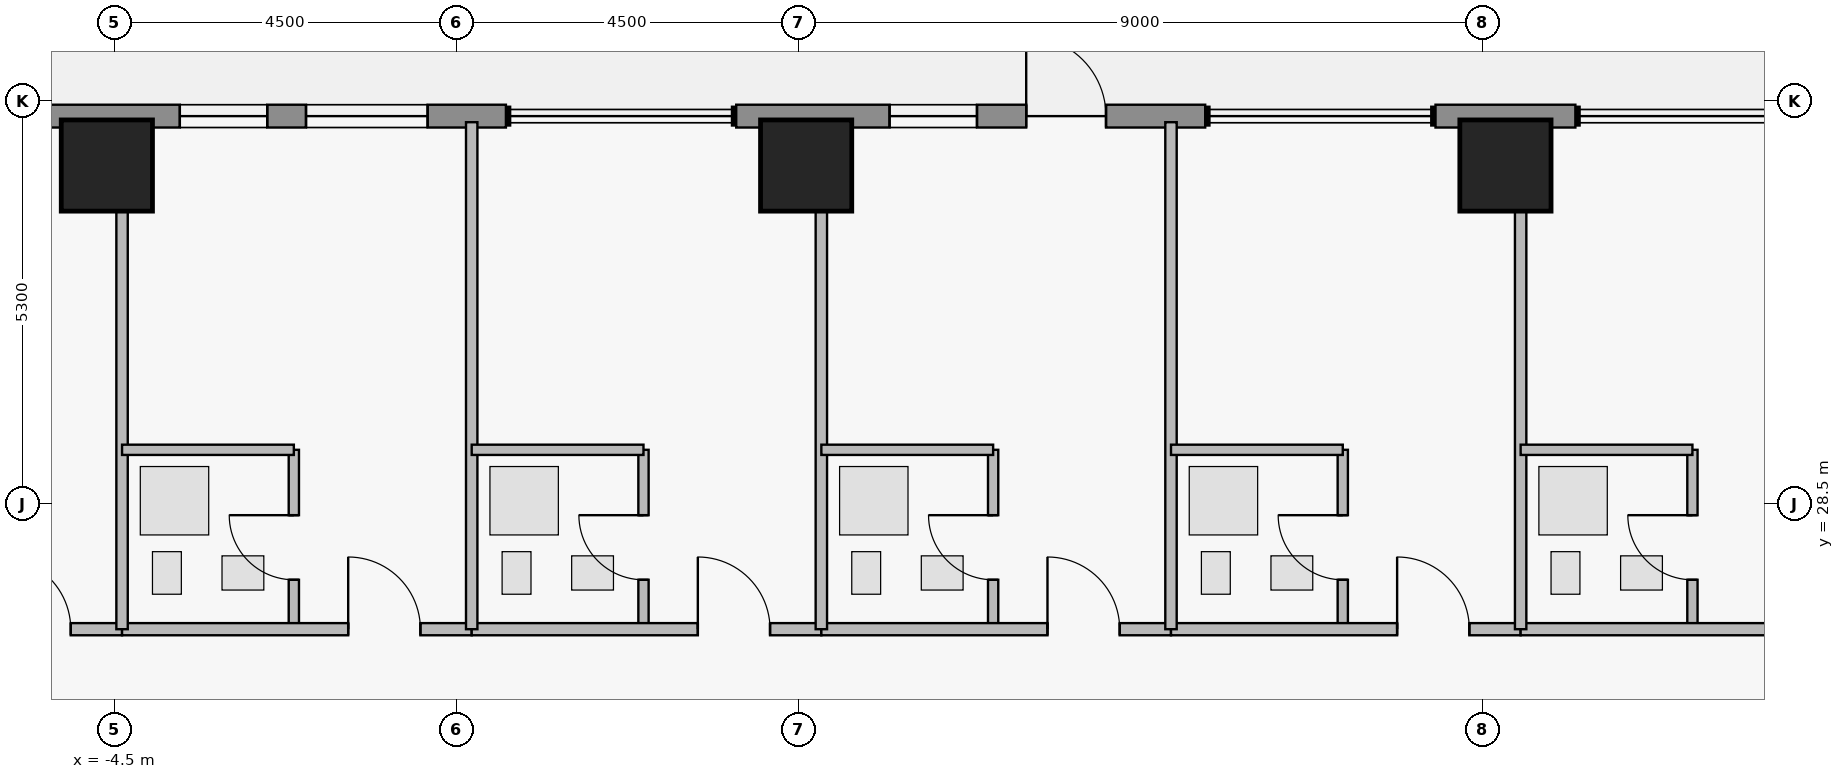
"""IFC4 building model, lengths in metres.
Left out: names, types, materials, properties, quantities, classifications, styles, units other than length and angle.
Written with IfcOpenShell. Run it as: python <this file> out.ifc"""

import sys

from ifc_helpers import new_model, si_unit, direction, frame, frame_2d, origin, origin_2d, place, context, subcontext, project, spatial, rectangle, extrude, element, fill, save


model = new_model("IFC4")
c1 = context("Model", 3, precision=1e-05, world=origin(), true_north=direction((0.0, 1.0)))
c2 = subcontext(c1, "Body", "Model", "MODEL_VIEW")
j1 = project(units=[si_unit("LENGTHUNIT", "METRE"), si_unit("PLANEANGLEUNIT", "RADIAN")], contexts=[c1])
p1 = place(None, origin())
s1 = spatial("IfcSite", under=j1, at=p1, CompositionType="ELEMENT")
p2 = place(p1, origin())
s2 = spatial("IfcBuilding", under=s1, at=p2, CompositionType="ELEMENT")
p3 = place(p2, frame((0.0, 0.0, 222.4)))
s3 = spatial("IfcBuildingStorey", under=s2, at=p3, CompositionType="ELEMENT", Elevation=222.4)
for number, where, z_axis, x_axis in (
    (1, (-4.6, 32.95, 0.0), (0.0, 0.0, 1.0), (1.0, 0.0, 0.0)),
    (2, (4.6, 32.95, 0.0), (0.0, 0.0, 1.0), (1.0, 0.0, 0.0)),
    (3, (13.8, 32.95, 0.0), (0.0, 0.0, 1.0), (1.0, 0.0, 0.0)),
):
    element("IfcColumn", number, at=place(p3, frame(where, z_axis=z_axis, x_axis=x_axis)), inside=s3, PredefinedType="COLUMN", context=c2, shape_type="SweptSolid", body=[
        extrude(rectangle(XDim=1.2, YDim=1.2, at=origin_2d()), origin(), (0.0, 0.0, 1.0), 3.75),
    ])
p4 = place(p3, frame((-5.52, 33.6, 0.0), z_axis=(0.0, 0.0, 1.0), x_axis=(1.0, 0.0, 0.0)))
e4 = element("IfcWall", 4, at=p4, inside=s3, PredefinedType="STANDARD", context=c2, shape_type="SweptSolid", body=[
    extrude(rectangle(XDim=6.17, YDim=0.3, at=frame_2d((3.085, 0.0))), origin(), (0.0, 0.0, 1.0), 3.53),
])
p5 = place(p4, frame((3.54, 0.0, 0.85)))
e5 = element("IfcOpeningElement", 5, at=p5, cuts=e4, PredefinedType="OPENING", context=c2, shape_type="SweptSolid", body=[
    extrude(rectangle(XDim=1.6, YDim=1.8, at=frame_2d((0.8, 0.9))), frame((0.0, 0.16, 0.0), z_axis=(0.0, -1.0, 0.0), x_axis=(1.0, 0.0, 0.0)), (0.0, 0.0, 1.0), 0.32),
])
p6 = place(p4, frame((1.88, 0.0, 0.95)))
e6 = element("IfcOpeningElement", 6, at=p6, cuts=e4, PredefinedType="OPENING", context=c2, shape_type="SweptSolid", body=[
    extrude(rectangle(XDim=1.15, YDim=1.55, at=frame_2d((0.575, 0.775))), frame((0.0, 0.16, 0.0), z_axis=(0.0, -1.0, 0.0), x_axis=(1.0, 0.0, 0.0)), (0.0, 0.0, 1.0), 0.32),
])
p7 = place(p3, frame((3.68, 33.6, 0.0), z_axis=(0.0, 0.0, 1.0), x_axis=(1.0, 0.0, 0.0)))
e7 = element("IfcWall", 7, at=p7, inside=s3, PredefinedType="STANDARD", context=c2, shape_type="SweptSolid", body=[
    extrude(rectangle(XDim=6.17, YDim=0.3, at=frame_2d((3.085, 0.0))), origin(), (0.0, 0.0, 1.0), 3.53),
])
p8 = place(p7, frame((3.815, 0.0, 0.0)))
e8 = element("IfcOpeningElement", 8, at=p8, cuts=e7, PredefinedType="OPENING", context=c2, shape_type="SweptSolid", body=[
    extrude(rectangle(XDim=1.05, YDim=2.2, at=frame_2d((0.525, 1.1))), frame((0.0, 0.16, 0.0), z_axis=(0.0, -1.0, 0.0), x_axis=(1.0, 0.0, 0.0)), (0.0, 0.0, 1.0), 0.32),
])
p9 = place(p7, frame((2.018, 0.0, 0.95)))
e9 = element("IfcOpeningElement", 9, at=p9, cuts=e7, PredefinedType="OPENING", context=c2, shape_type="SweptSolid", body=[
    extrude(rectangle(XDim=1.15, YDim=1.55, at=frame_2d((0.575, 0.775))), frame((0.0, 0.16, 0.0), z_axis=(0.0, -1.0, 0.0), x_axis=(1.0, 0.0, 0.0)), (0.0, 0.0, 1.0), 0.32),
])
p10 = place(p3, frame((12.88, 33.6, 0.0), z_axis=(0.0, 0.0, 1.0), x_axis=(1.0, 0.0, 0.0)))
e10 = element("IfcWall", 10, at=p10, inside=s3, PredefinedType="STANDARD", context=c2, shape_type="SweptSolid", body=[
    extrude(rectangle(XDim=1.84, YDim=0.3, at=frame_2d((0.92, 0.0))), origin(), (0.0, 0.0, 1.0), 3.53),
])
p11 = place(p3, frame((-9.0, 26.85, 0.0), z_axis=(0.0, 0.0, 1.0), x_axis=(1.0, 0.0, 0.0)))
e11 = element("IfcWall", 11, at=p11, inside=s3, PredefinedType="PARTITIONING", context=c2, shape_type="SweptSolid", body=[
    extrude(rectangle(XDim=4.6, YDim=0.16, at=frame_2d((2.3, 0.0))), origin(), (0.0, 0.0, 1.0), 3.53),
])
p12 = place(p11, frame((2.975, 0.0, 0.0)))
e12 = element("IfcOpeningElement", 12, at=p12, cuts=e11, PredefinedType="OPENING", context=c2, shape_type="SweptSolid", body=[
    extrude(rectangle(XDim=0.95, YDim=2.15, at=frame_2d((0.475, 1.075))), frame((0.0, 0.09, 0.0), z_axis=(0.0, -1.0, 0.0), x_axis=(1.0, 0.0, 0.0)), (0.0, 0.0, 1.0), 0.18),
])
p13 = place(p3, frame((-2.14, 26.85, 0.0), z_axis=(0.0, 0.0, 1.0), x_axis=(0.0, 1.0, 0.0)))
e13 = element("IfcWall", 13, at=p13, inside=s3, PredefinedType="PLUMBINGWALL", context=c2, shape_type="SweptSolid", body=[
    extrude(rectangle(XDim=2.36, YDim=0.135, at=frame_2d((1.18, 0.0))), origin(), (0.0, 0.0, 1.0), 3.53),
])
p14 = place(p13, frame((0.65, 0.0, 0.0)))
e14 = element("IfcOpeningElement", 14, at=p14, cuts=e13, PredefinedType="OPENING", context=c2, shape_type="SweptSolid", body=[
    extrude(rectangle(XDim=0.85, YDim=2.1, at=frame_2d((0.425, 1.05))), frame((0.0, 0.077, 0.0), z_axis=(0.0, -1.0, 0.0), x_axis=(1.0, 0.0, 0.0)), (0.0, 0.0, 1.0), 0.155),
])
p15 = place(p3, frame((-4.4, 26.85, 0.0), z_axis=(0.0, 0.0, 1.0), x_axis=(1.0, 0.0, 0.0)))
e15 = element("IfcWall", 15, at=p15, inside=s3, PredefinedType="PARTITIONING", context=c2, shape_type="SweptSolid", body=[
    extrude(rectangle(XDim=4.6, YDim=0.16, at=frame_2d((2.3, 0.0))), origin(), (0.0, 0.0, 1.0), 3.53),
])
p16 = place(p15, frame((2.975, 0.0, 0.0)))
e16 = element("IfcOpeningElement", 16, at=p16, cuts=e15, PredefinedType="OPENING", context=c2, shape_type="SweptSolid", body=[
    extrude(rectangle(XDim=0.95, YDim=2.15, at=frame_2d((0.475, 1.075))), frame((0.0, 0.09, 0.0), z_axis=(0.0, -1.0, 0.0), x_axis=(1.0, 0.0, 0.0)), (0.0, 0.0, 1.0), 0.18),
])
p17 = place(p3, frame((2.46, 26.85, 0.0), z_axis=(0.0, 0.0, 1.0), x_axis=(0.0, 1.0, 0.0)))
e17 = element("IfcWall", 17, at=p17, inside=s3, PredefinedType="PLUMBINGWALL", context=c2, shape_type="SweptSolid", body=[
    extrude(rectangle(XDim=2.36, YDim=0.135, at=frame_2d((1.18, 0.0))), origin(), (0.0, 0.0, 1.0), 3.53),
])
p18 = place(p17, frame((0.65, 0.0, 0.0)))
e18 = element("IfcOpeningElement", 18, at=p18, cuts=e17, PredefinedType="OPENING", context=c2, shape_type="SweptSolid", body=[
    extrude(rectangle(XDim=0.85, YDim=2.1, at=frame_2d((0.425, 1.05))), frame((0.0, 0.077, 0.0), z_axis=(0.0, -1.0, 0.0), x_axis=(1.0, 0.0, 0.0)), (0.0, 0.0, 1.0), 0.155),
])
p19 = place(p3, frame((0.2, 26.85, 0.0), z_axis=(0.0, 0.0, 1.0), x_axis=(1.0, 0.0, 0.0)))
e19 = element("IfcWall", 19, at=p19, inside=s3, PredefinedType="PARTITIONING", context=c2, shape_type="SweptSolid", body=[
    extrude(rectangle(XDim=4.6, YDim=0.16, at=frame_2d((2.3, 0.0))), origin(), (0.0, 0.0, 1.0), 3.53),
])
p20 = place(p19, frame((2.975, 0.0, 0.0)))
e20 = element("IfcOpeningElement", 20, at=p20, cuts=e19, PredefinedType="OPENING", context=c2, shape_type="SweptSolid", body=[
    extrude(rectangle(XDim=0.95, YDim=2.15, at=frame_2d((0.475, 1.075))), frame((0.0, 0.09, 0.0), z_axis=(0.0, -1.0, 0.0), x_axis=(1.0, 0.0, 0.0)), (0.0, 0.0, 1.0), 0.18),
])
p21 = place(p3, frame((7.06, 26.85, 0.0), z_axis=(0.0, 0.0, 1.0), x_axis=(0.0, 1.0, 0.0)))
e21 = element("IfcWall", 21, at=p21, inside=s3, PredefinedType="PLUMBINGWALL", context=c2, shape_type="SweptSolid", body=[
    extrude(rectangle(XDim=2.36, YDim=0.135, at=frame_2d((1.18, 0.0))), origin(), (0.0, 0.0, 1.0), 3.53),
])
p22 = place(p21, frame((0.65, 0.0, 0.0)))
e22 = element("IfcOpeningElement", 22, at=p22, cuts=e21, PredefinedType="OPENING", context=c2, shape_type="SweptSolid", body=[
    extrude(rectangle(XDim=0.85, YDim=2.1, at=frame_2d((0.425, 1.05))), frame((0.0, 0.077, 0.0), z_axis=(0.0, -1.0, 0.0), x_axis=(1.0, 0.0, 0.0)), (0.0, 0.0, 1.0), 0.155),
])
p23 = place(p3, frame((4.8, 26.85, 0.0), z_axis=(0.0, 0.0, 1.0), x_axis=(1.0, 0.0, 0.0)))
e23 = element("IfcWall", 23, at=p23, inside=s3, PredefinedType="PARTITIONING", context=c2, shape_type="SweptSolid", body=[
    extrude(rectangle(XDim=4.6, YDim=0.16, at=frame_2d((2.3, 0.0))), origin(), (0.0, 0.0, 1.0), 3.53),
])
p24 = place(p23, frame((2.975, 0.0, 0.0)))
e24 = element("IfcOpeningElement", 24, at=p24, cuts=e23, PredefinedType="OPENING", context=c2, shape_type="SweptSolid", body=[
    extrude(rectangle(XDim=0.95, YDim=2.15, at=frame_2d((0.475, 1.075))), frame((0.0, 0.09, 0.0), z_axis=(0.0, -1.0, 0.0), x_axis=(1.0, 0.0, 0.0)), (0.0, 0.0, 1.0), 0.18),
])
p25 = place(p3, frame((11.66, 26.85, 0.0), z_axis=(0.0, 0.0, 1.0), x_axis=(0.0, 1.0, 0.0)))
e25 = element("IfcWall", 25, at=p25, inside=s3, PredefinedType="PLUMBINGWALL", context=c2, shape_type="SweptSolid", body=[
    extrude(rectangle(XDim=2.36, YDim=0.135, at=frame_2d((1.18, 0.0))), origin(), (0.0, 0.0, 1.0), 3.53),
])
p26 = place(p25, frame((0.65, 0.0, 0.0)))
e26 = element("IfcOpeningElement", 26, at=p26, cuts=e25, PredefinedType="OPENING", context=c2, shape_type="SweptSolid", body=[
    extrude(rectangle(XDim=0.85, YDim=2.1, at=frame_2d((0.425, 1.05))), frame((0.0, 0.077, 0.0), z_axis=(0.0, -1.0, 0.0), x_axis=(1.0, 0.0, 0.0)), (0.0, 0.0, 1.0), 0.155),
])
p27 = place(p3, frame((9.4, 26.85, 0.0), z_axis=(0.0, 0.0, 1.0), x_axis=(1.0, 0.0, 0.0)))
e27 = element("IfcWall", 27, at=p27, inside=s3, PredefinedType="PARTITIONING", context=c2, shape_type="SweptSolid", body=[
    extrude(rectangle(XDim=4.6, YDim=0.16, at=frame_2d((2.3, 0.0))), origin(), (0.0, 0.0, 1.0), 3.53),
])
p28 = place(p27, frame((2.975, 0.0, 0.0)))
e28 = element("IfcOpeningElement", 28, at=p28, cuts=e27, PredefinedType="OPENING", context=c2, shape_type="SweptSolid", body=[
    extrude(rectangle(XDim=0.95, YDim=2.15, at=frame_2d((0.475, 1.075))), frame((0.0, 0.09, 0.0), z_axis=(0.0, -1.0, 0.0), x_axis=(1.0, 0.0, 0.0)), (0.0, 0.0, 1.0), 0.18),
])
p29 = place(p3, frame((16.26, 26.85, 0.0), z_axis=(0.0, 0.0, 1.0), x_axis=(0.0, 1.0, 0.0)))
e29 = element("IfcWall", 29, at=p29, inside=s3, PredefinedType="PLUMBINGWALL", context=c2, shape_type="SweptSolid", body=[
    extrude(rectangle(XDim=2.36, YDim=0.135, at=frame_2d((1.18, 0.0))), origin(), (0.0, 0.0, 1.0), 3.53),
])
p30 = place(p29, frame((0.65, 0.0, 0.0)))
e30 = element("IfcOpeningElement", 30, at=p30, cuts=e29, PredefinedType="OPENING", context=c2, shape_type="SweptSolid", body=[
    extrude(rectangle(XDim=0.85, YDim=2.1, at=frame_2d((0.425, 1.05))), frame((0.0, 0.077, 0.0), z_axis=(0.0, -1.0, 0.0), x_axis=(1.0, 0.0, 0.0)), (0.0, 0.0, 1.0), 0.155),
])
p31 = place(p3, frame((14.0, 26.85, 0.0), z_axis=(0.0, 0.0, 1.0), x_axis=(1.0, 0.0, 0.0)))
e31 = element("IfcWall", 31, at=p31, inside=s3, PredefinedType="PARTITIONING", context=c2, shape_type="SweptSolid", body=[
    extrude(rectangle(XDim=8.04, YDim=0.16, at=frame_2d((4.02, 0.0))), origin(), (0.0, 0.0, 1.0), 3.53),
])
p32 = place(p31, frame((4.67, 0.0, 0.0)))
e32 = element("IfcOpeningElement", 32, at=p32, cuts=e31, PredefinedType="OPENING", context=c2, shape_type="SweptSolid", body=[
    extrude(rectangle(XDim=1.0, YDim=2.15, at=frame_2d((0.5, 1.075))), frame((0.0, 0.09, 0.0), z_axis=(0.0, -1.0, 0.0), x_axis=(1.0, 0.0, 0.0)), (0.0, 0.0, 1.0), 0.18),
])
p33 = place(p3, frame((-4.4, 26.85, 0.0), z_axis=(0.0, 0.0, 1.0), x_axis=(0.0, 1.0, 0.0)))
e33 = element("IfcWall", 33, at=p33, inside=s3, PredefinedType="PARTITIONING", context=c2, shape_type="SweptSolid", body=[
    extrude(rectangle(XDim=6.67, YDim=0.15, at=frame_2d((3.335, 0.0))), origin(), (0.0, 0.0, 1.0), 2.519),
])
p34 = place(p3, frame((-4.4, 29.21, 0.0), z_axis=(0.0, 0.0, 1.0), x_axis=(1.0, 0.0, 0.0)))
e34 = element("IfcWall", 34, at=p34, inside=s3, PredefinedType="PLUMBINGWALL", context=c2, shape_type="SweptSolid", body=[
    extrude(rectangle(XDim=2.26, YDim=0.135, at=frame_2d((1.13, 0.0))), origin(), (0.0, 0.0, 1.0), 3.53),
])
p35 = place(p3, frame((0.2, 26.85, 0.0), z_axis=(0.0, 0.0, 1.0), x_axis=(0.0, 1.0, 0.0)))
e35 = element("IfcWall", 35, at=p35, inside=s3, PredefinedType="PARTITIONING", context=c2, shape_type="SweptSolid", body=[
    extrude(rectangle(XDim=6.67, YDim=0.15, at=frame_2d((3.335, 0.0))), origin(), (0.0, 0.0, 1.0), 3.53),
])
p36 = place(p3, frame((0.2, 29.21, 0.0), z_axis=(0.0, 0.0, 1.0), x_axis=(1.0, 0.0, 0.0)))
e36 = element("IfcWall", 36, at=p36, inside=s3, PredefinedType="PLUMBINGWALL", context=c2, shape_type="SweptSolid", body=[
    extrude(rectangle(XDim=2.26, YDim=0.135, at=frame_2d((1.13, 0.0))), origin(), (0.0, 0.0, 1.0), 3.53),
])
p37 = place(p3, frame((4.8, 26.85, 0.0), z_axis=(0.0, 0.0, 1.0), x_axis=(0.0, 1.0, 0.0)))
e37 = element("IfcWall", 37, at=p37, inside=s3, PredefinedType="PARTITIONING", context=c2, shape_type="SweptSolid", body=[
    extrude(rectangle(XDim=6.67, YDim=0.15, at=frame_2d((3.335, 0.0))), origin(), (0.0, 0.0, 1.0), 2.519),
])
p38 = place(p3, frame((4.8, 29.21, 0.0), z_axis=(0.0, 0.0, 1.0), x_axis=(1.0, 0.0, 0.0)))
e38 = element("IfcWall", 38, at=p38, inside=s3, PredefinedType="PLUMBINGWALL", context=c2, shape_type="SweptSolid", body=[
    extrude(rectangle(XDim=2.26, YDim=0.135, at=frame_2d((1.13, 0.0))), origin(), (0.0, 0.0, 1.0), 3.53),
])
p39 = place(p3, frame((9.4, 26.85, 0.0), z_axis=(0.0, 0.0, 1.0), x_axis=(0.0, 1.0, 0.0)))
e39 = element("IfcWall", 39, at=p39, inside=s3, PredefinedType="PARTITIONING", context=c2, shape_type="SweptSolid", body=[
    extrude(rectangle(XDim=6.67, YDim=0.15, at=frame_2d((3.335, 0.0))), origin(), (0.0, 0.0, 1.0), 3.53),
])
p40 = place(p3, frame((9.4, 29.21, 0.0), z_axis=(0.0, 0.0, 1.0), x_axis=(1.0, 0.0, 0.0)))
e40 = element("IfcWall", 40, at=p40, inside=s3, PredefinedType="PLUMBINGWALL", context=c2, shape_type="SweptSolid", body=[
    extrude(rectangle(XDim=2.26, YDim=0.135, at=frame_2d((1.13, 0.0))), origin(), (0.0, 0.0, 1.0), 3.53),
])
p41 = place(p3, frame((14.0, 26.85, 0.0), z_axis=(0.0, 0.0, 1.0), x_axis=(0.0, 1.0, 0.0)))
e41 = element("IfcWall", 41, at=p41, inside=s3, PredefinedType="PARTITIONING", context=c2, shape_type="SweptSolid", body=[
    extrude(rectangle(XDim=6.67, YDim=0.15, at=frame_2d((3.335, 0.0))), origin(), (0.0, 0.0, 1.0), 2.519),
])
p42 = place(p3, frame((14.0, 29.21, 0.0), z_axis=(0.0, 0.0, 1.0), x_axis=(1.0, 0.0, 0.0)))
e42 = element("IfcWall", 42, at=p42, inside=s3, PredefinedType="PLUMBINGWALL", context=c2, shape_type="SweptSolid", body=[
    extrude(rectangle(XDim=2.26, YDim=0.135, at=frame_2d((1.13, 0.0))), origin(), (0.0, 0.0, 1.0), 3.53),
])
p43 = place(p5, origin())
e43 = element("IfcWindow", 43, at=p43, inside=s3, PartitioningType="SINGLE_PANEL", PredefinedType="WINDOW", context=c2, shape_type="SweptSolid", body=[
    extrude(rectangle(XDim=1.6, YDim=1.8, at=frame_2d((0.8, 0.9))), frame((0.0, 0.03, 0.0), z_axis=(0.0, -1.0, 0.0), x_axis=(1.0, 0.0, 0.0)), (0.0, 0.0, 1.0), 0.06),
])
fill(e5, e43)
p44 = place(p6, origin())
e44 = element("IfcWindow", 44, at=p44, inside=s3, PartitioningType="SINGLE_PANEL", PredefinedType="WINDOW", context=c2, shape_type="SweptSolid", body=[
    extrude(rectangle(XDim=1.15, YDim=1.55, at=frame_2d((0.575, 0.775))), frame((0.0, 0.03, 0.0), z_axis=(0.0, -1.0, 0.0), x_axis=(1.0, 0.0, 0.0)), (0.0, 0.0, 1.0), 0.06),
])
fill(e6, e44)
p45 = place(p8, origin())
e45 = element("IfcDoor", 45, at=p45, inside=s3, OperationType="SINGLE_SWING_LEFT", PredefinedType="DOOR", context=c2, shape_type="SweptSolid", body=[
    extrude(rectangle(XDim=1.05, YDim=2.2, at=frame_2d((0.525, 1.1))), frame((0.0, 0.025, 0.0), z_axis=(0.0, -1.0, 0.0), x_axis=(1.0, 0.0, 0.0)), (0.0, 0.0, 1.0), 0.05),
])
fill(e8, e45)
p46 = place(p9, origin())
e46 = element("IfcWindow", 46, at=p46, inside=s3, PartitioningType="SINGLE_PANEL", PredefinedType="WINDOW", context=c2, shape_type="SweptSolid", body=[
    extrude(rectangle(XDim=1.15, YDim=1.55, at=frame_2d((0.575, 0.775))), frame((0.0, 0.03, 0.0), z_axis=(0.0, -1.0, 0.0), x_axis=(1.0, 0.0, 0.0)), (0.0, 0.0, 1.0), 0.06),
])
fill(e9, e46)
p47 = place(p12, origin())
e47 = element("IfcDoor", 47, at=p47, inside=s3, OperationType="SINGLE_SWING_LEFT", PredefinedType="DOOR", context=c2, shape_type="SweptSolid", body=[
    extrude(rectangle(XDim=0.95, YDim=2.15, at=frame_2d((0.475, 1.075))), frame((0.0, 0.025, 0.0), z_axis=(0.0, -1.0, 0.0), x_axis=(1.0, 0.0, 0.0)), (0.0, 0.0, 1.0), 0.05),
])
fill(e12, e47)
p48 = place(p14, origin())
e48 = element("IfcDoor", 48, at=p48, inside=s3, OperationType="SINGLE_SWING_RIGHT", PredefinedType="DOOR", context=c2, shape_type="SweptSolid", body=[
    extrude(rectangle(XDim=0.85, YDim=2.1, at=frame_2d((0.425, 1.05))), frame((0.0, 0.025, 0.0), z_axis=(0.0, -1.0, 0.0), x_axis=(1.0, 0.0, 0.0)), (0.0, 0.0, 1.0), 0.05),
])
fill(e14, e48)
p49 = place(p16, origin())
e49 = element("IfcDoor", 49, at=p49, inside=s3, OperationType="SINGLE_SWING_LEFT", PredefinedType="DOOR", context=c2, shape_type="SweptSolid", body=[
    extrude(rectangle(XDim=0.95, YDim=2.15, at=frame_2d((0.475, 1.075))), frame((0.0, 0.025, 0.0), z_axis=(0.0, -1.0, 0.0), x_axis=(1.0, 0.0, 0.0)), (0.0, 0.0, 1.0), 0.05),
])
fill(e16, e49)
p50 = place(p18, origin())
e50 = element("IfcDoor", 50, at=p50, inside=s3, OperationType="SINGLE_SWING_RIGHT", PredefinedType="DOOR", context=c2, shape_type="SweptSolid", body=[
    extrude(rectangle(XDim=0.85, YDim=2.1, at=frame_2d((0.425, 1.05))), frame((0.0, 0.025, 0.0), z_axis=(0.0, -1.0, 0.0), x_axis=(1.0, 0.0, 0.0)), (0.0, 0.0, 1.0), 0.05),
])
fill(e18, e50)
p51 = place(p20, origin())
e51 = element("IfcDoor", 51, at=p51, inside=s3, OperationType="SINGLE_SWING_LEFT", PredefinedType="DOOR", context=c2, shape_type="SweptSolid", body=[
    extrude(rectangle(XDim=0.95, YDim=2.15, at=frame_2d((0.475, 1.075))), frame((0.0, 0.025, 0.0), z_axis=(0.0, -1.0, 0.0), x_axis=(1.0, 0.0, 0.0)), (0.0, 0.0, 1.0), 0.05),
])
fill(e20, e51)
p52 = place(p22, origin())
e52 = element("IfcDoor", 52, at=p52, inside=s3, OperationType="SINGLE_SWING_RIGHT", PredefinedType="DOOR", context=c2, shape_type="SweptSolid", body=[
    extrude(rectangle(XDim=0.85, YDim=2.1, at=frame_2d((0.425, 1.05))), frame((0.0, 0.025, 0.0), z_axis=(0.0, -1.0, 0.0), x_axis=(1.0, 0.0, 0.0)), (0.0, 0.0, 1.0), 0.05),
])
fill(e22, e52)
p53 = place(p24, origin())
e53 = element("IfcDoor", 53, at=p53, inside=s3, OperationType="SINGLE_SWING_LEFT", PredefinedType="DOOR", context=c2, shape_type="SweptSolid", body=[
    extrude(rectangle(XDim=0.95, YDim=2.15, at=frame_2d((0.475, 1.075))), frame((0.0, 0.025, 0.0), z_axis=(0.0, -1.0, 0.0), x_axis=(1.0, 0.0, 0.0)), (0.0, 0.0, 1.0), 0.05),
])
fill(e24, e53)
p54 = place(p26, origin())
e54 = element("IfcDoor", 54, at=p54, inside=s3, OperationType="SINGLE_SWING_RIGHT", PredefinedType="DOOR", context=c2, shape_type="SweptSolid", body=[
    extrude(rectangle(XDim=0.85, YDim=2.1, at=frame_2d((0.425, 1.05))), frame((0.0, 0.025, 0.0), z_axis=(0.0, -1.0, 0.0), x_axis=(1.0, 0.0, 0.0)), (0.0, 0.0, 1.0), 0.05),
])
fill(e26, e54)
p55 = place(p28, origin())
e55 = element("IfcDoor", 55, at=p55, inside=s3, OperationType="SINGLE_SWING_LEFT", PredefinedType="DOOR", context=c2, shape_type="SweptSolid", body=[
    extrude(rectangle(XDim=0.95, YDim=2.15, at=frame_2d((0.475, 1.075))), frame((0.0, 0.025, 0.0), z_axis=(0.0, -1.0, 0.0), x_axis=(1.0, 0.0, 0.0)), (0.0, 0.0, 1.0), 0.05),
])
fill(e28, e55)
p56 = place(p30, origin())
e56 = element("IfcDoor", 56, at=p56, inside=s3, OperationType="SINGLE_SWING_RIGHT", PredefinedType="DOOR", context=c2, shape_type="SweptSolid", body=[
    extrude(rectangle(XDim=0.85, YDim=2.1, at=frame_2d((0.425, 1.05))), frame((0.0, 0.025, 0.0), z_axis=(0.0, -1.0, 0.0), x_axis=(1.0, 0.0, 0.0)), (0.0, 0.0, 1.0), 0.05),
])
fill(e30, e56)
save(model, sys.argv[1])
